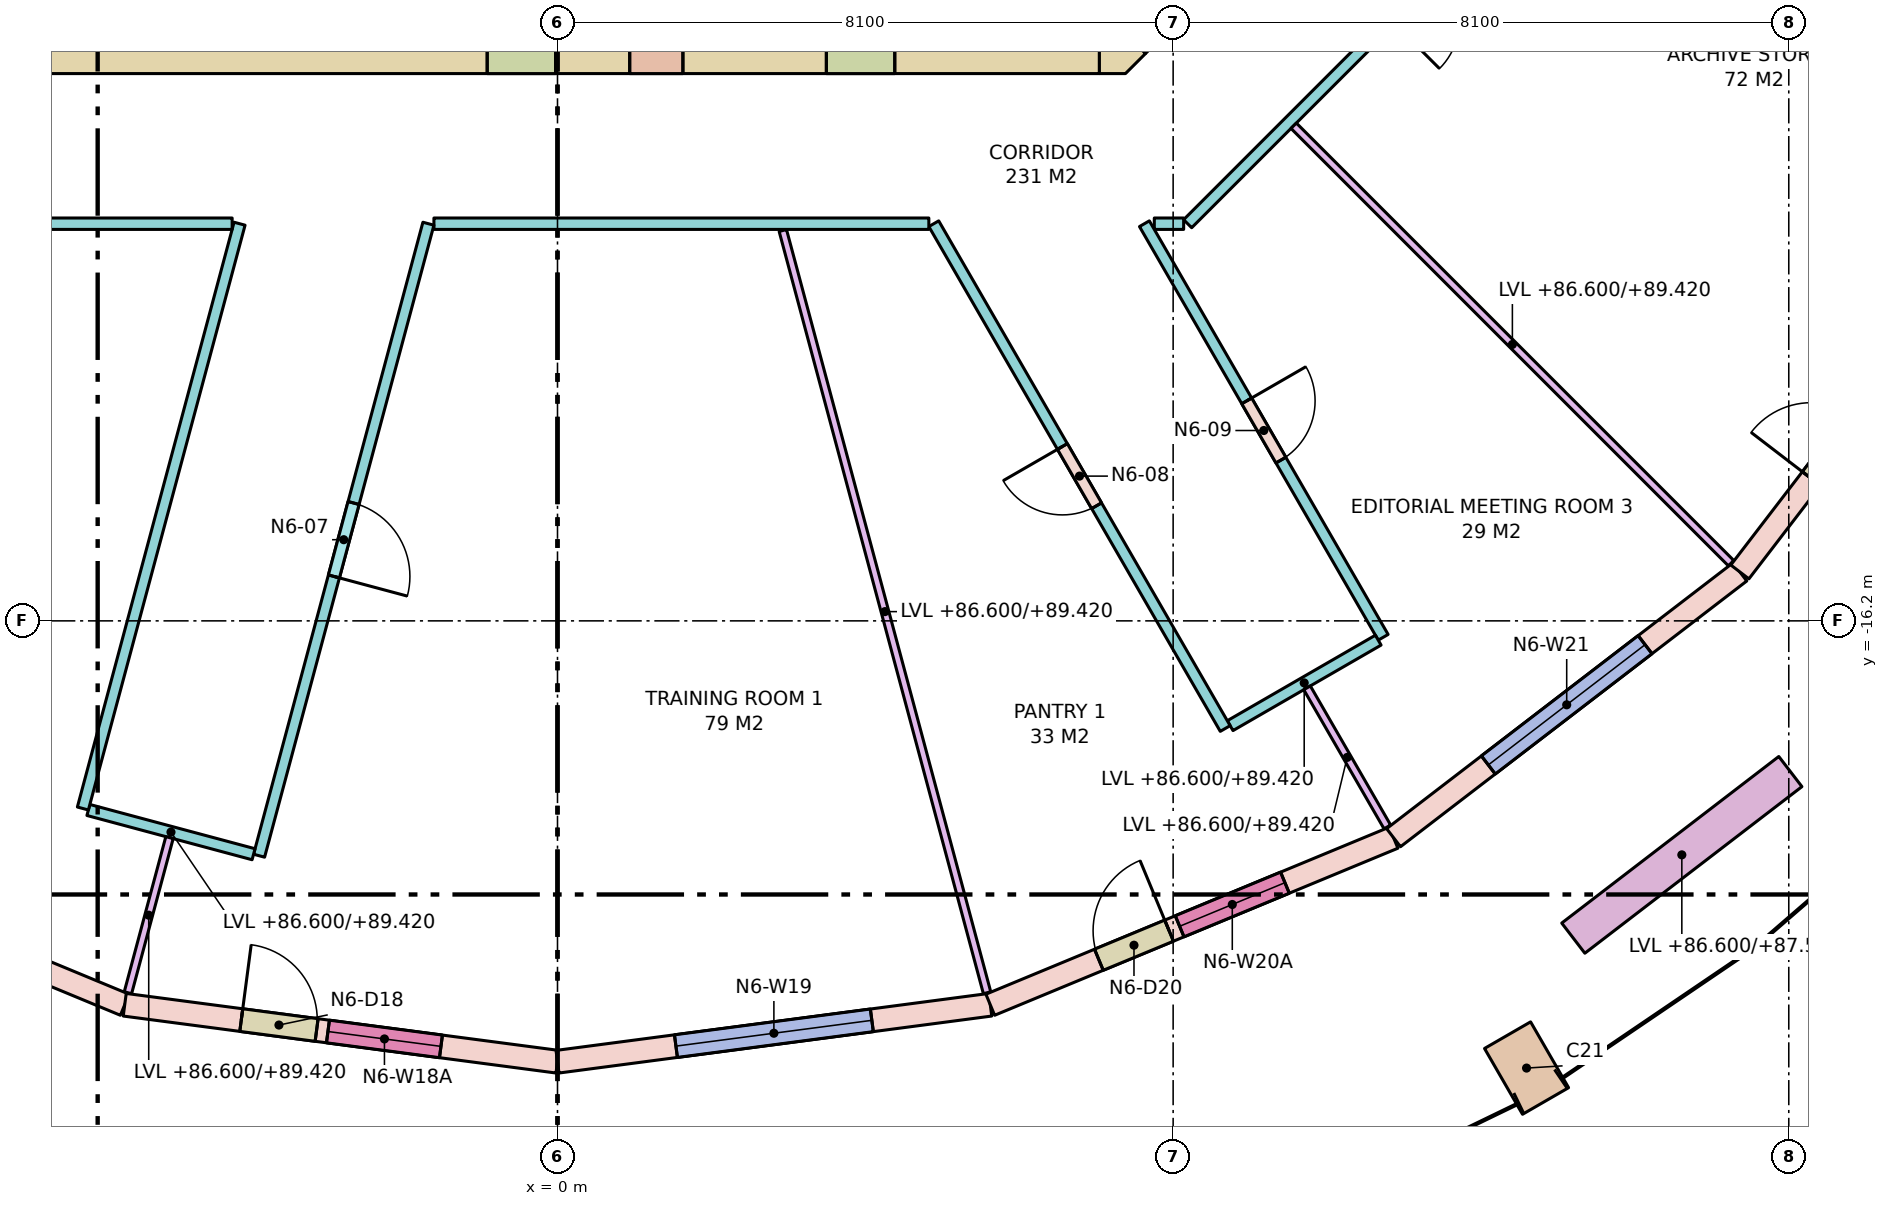
"""IFC4 building model, lengths in metres.
Left out: names, types, materials, properties, quantities, classifications, styles, units other than length and angle.
Written with IfcOpenShell. Run it as: python <this file> out.ifc"""

import sys

from ifc_helpers import new_model, si_unit, direction, frame, frame_2d, origin, origin_2d, place, context, subcontext, project, spatial, polyline, rectangle, outline, extrude, element, fill, save


model = new_model("IFC4")
c1 = context("Model", 3, precision=1e-05, world=origin(), true_north=direction((0.0, 1.0)))
c2 = subcontext(c1, "Body", "Model", "MODEL_VIEW")
j1 = project(units=[si_unit("LENGTHUNIT", "METRE"), si_unit("PLANEANGLEUNIT", "RADIAN")], contexts=[c1])
p1 = place(None, origin())
s1 = spatial("IfcSite", under=j1, at=p1, CompositionType="ELEMENT")
p2 = place(p1, origin())
s2 = spatial("IfcBuilding", under=s1, at=p2, CompositionType="ELEMENT")
p3 = place(p2, frame((0.0, 0.0, 86.6)))
s3 = spatial("IfcBuildingStorey", under=s2, at=p3, CompositionType="ELEMENT", Elevation=86.6)
p4 = place(p3, frame((12.75, -22.084, 0.0), z_axis=(0.0, 0.0, 1.0), x_axis=(0.866025403784, 0.5, 0.0)))
e1 = element("IfcColumn", 1, at=p4, inside=s3, PredefinedType="COLUMN", context=c2, shape_type="SweptSolid", body=[
    extrude(rectangle(XDim=0.7, YDim=1.0, at=origin_2d()), origin(), (0.0, 0.0, 1.0), 4.0),
])
p5 = place(p3, frame((-7.13, -8.55, -0.28), z_axis=(0.0, 0.0, 1.0), x_axis=(1.0, 0.0, 0.0)))
e2 = element("IfcWall", 2, at=p5, inside=s3, PredefinedType="SHEAR", context=c2, shape_type="SweptSolid", body=[
    extrude(rectangle(XDim=14.26, YDim=0.9, at=frame_2d((7.13, 0.0))), origin(), (0.0, 0.0, 1.0), 4.0),
])
p6 = place(p5, frame((8.08, 0.0, 0.28)))
e3 = element("IfcOpeningElement", 3, at=p6, cuts=e2, PredefinedType="OPENING", context=c2, shape_type="SweptSolid", body=[
    extrude(rectangle(XDim=0.7, YDim=2.1, at=frame_2d((0.35, 1.05))), frame((0.0, 0.46, 0.0), z_axis=(0.0, -1.0, 0.0), x_axis=(1.0, 0.0, 0.0)), (0.0, 0.0, 1.0), 0.92),
])
p7 = place(p5, frame((6.205, 0.0, 0.28)))
e4 = element("IfcOpeningElement", 4, at=p7, cuts=e2, PredefinedType="OPENING", context=c2, shape_type="SweptSolid", body=[
    extrude(rectangle(XDim=0.9, YDim=2.1, at=frame_2d((0.45, 1.05))), frame((0.0, 0.46, 0.0), z_axis=(0.0, -1.0, 0.0), x_axis=(1.0, 0.0, 0.0)), (0.0, 0.0, 1.0), 0.92),
])
p8 = place(p5, frame((10.667, 0.0, 0.28)))
e5 = element("IfcOpeningElement", 5, at=p8, cuts=e2, PredefinedType="OPENING", context=c2, shape_type="SweptSolid", body=[
    extrude(rectangle(XDim=0.9, YDim=2.1, at=frame_2d((0.45, 1.05))), frame((0.0, 0.46, 0.0), z_axis=(0.0, -1.0, 0.0), x_axis=(1.0, 0.0, 0.0)), (0.0, 0.0, 1.0), 0.92),
])
p9 = place(p3, frame((10.418, -5.418, -0.28), z_axis=(0.0, 0.0, 1.0), x_axis=(-0.707106781187, -0.707106781187, 0.0)))
e6 = element("IfcWall", 6, at=p9, inside=s3, PredefinedType="SHEAR", context=c2, shape_type="SweptSolid", body=[
    extrude(rectangle(XDim=4.243, YDim=0.9, at=frame_2d((2.121, 0.0))), origin(), (0.0, 0.0, 1.0), 4.0),
])
p10 = place(p9, frame((0.52, 0.0, 0.28)))
e7 = element("IfcOpeningElement", 7, at=p10, cuts=e6, PredefinedType="OPENING", context=c2, shape_type="SweptSolid", body=[
    extrude(rectangle(XDim=0.9, YDim=2.1, at=frame_2d((0.45, 1.05))), frame((0.0, 0.46, 0.0), z_axis=(0.0, -1.0, 0.0), x_axis=(1.0, 0.0, 0.0)), (0.0, 0.0, 1.0), 0.92),
])
p11 = place(p3, frame((0.0, 0.0, -0.28)))
e8 = element("IfcWall", 8, at=p11, inside=s3, PredefinedType="SHEAR", context=c2, shape_type="SweptSolid", body=[
    extrude(outline(polyline([(7.473, -9.0), (7.13, -9.0), (7.13, -8.13), (7.736, -8.736), (7.473, -9.0)])), origin(), (0.0, 0.0, 1.0), 4.0),
])
p12 = place(p3, frame((-11.0, -19.052, 0.0), z_axis=(0.0, 0.0, 1.0), x_axis=(0.923866055759, -0.382715966503, 0.0)))
e9 = element("IfcWall", 9, at=p12, inside=s3, PredefinedType="STANDARD", context=c2, shape_type="SweptSolid", body=[
    extrude(rectangle(XDim=5.743, YDim=0.3, at=frame_2d((2.872, 0.0))), origin(), (0.0, 0.0, 1.0), 3.72),
])
p13 = place(p12, frame((1.572, 0.0, 0.8)))
e10 = element("IfcOpeningElement", 10, at=p13, cuts=e9, PredefinedType="OPENING", context=c2, shape_type="SweptSolid", body=[
    extrude(rectangle(XDim=2.6, YDim=2.7, at=frame_2d((1.3, 1.35))), frame((0.0, 0.16, 0.0), z_axis=(0.0, -1.0, 0.0), x_axis=(1.0, 0.0, 0.0)), (0.0, 0.0, 1.0), 0.32),
])
p14 = place(p3, frame((-5.694, -21.25, 0.0), z_axis=(0.0, 0.0, 1.0), x_axis=(0.991447783331, -0.130503995834, 0.0)))
e11 = element("IfcWall", 11, at=p14, inside=s3, PredefinedType="STANDARD", context=c2, shape_type="SweptSolid", body=[
    extrude(rectangle(XDim=5.743, YDim=0.3, at=frame_2d((2.872, 0.0))), origin(), (0.0, 0.0, 1.0), 3.72),
])
p15 = place(p14, frame((1.547, 0.0, 0.0)))
e12 = element("IfcOpeningElement", 12, at=p15, cuts=e11, PredefinedType="OPENING", context=c2, shape_type="SweptSolid", body=[
    extrude(rectangle(XDim=1.0, YDim=2.4, at=frame_2d((0.5, 1.2))), frame((0.0, 0.16, 0.0), z_axis=(0.0, -1.0, 0.0), x_axis=(1.0, 0.0, 0.0)), (0.0, 0.0, 1.0), 0.32),
])
p16 = place(p14, frame((2.697, 0.0, 0.8)))
e13 = element("IfcOpeningElement", 13, at=p16, cuts=e11, PredefinedType="OPENING", context=c2, shape_type="SweptSolid", body=[
    extrude(rectangle(XDim=1.5, YDim=2.7, at=frame_2d((0.75, 1.35))), frame((0.0, 0.16, 0.0), z_axis=(0.0, -1.0, 0.0), x_axis=(1.0, 0.0, 0.0)), (0.0, 0.0, 1.0), 0.32),
])
p17 = place(p3, frame((0.0, -22.0, 0.0), z_axis=(0.0, 0.0, 1.0), x_axis=(0.991447783331, 0.130503995834, 0.0)))
e14 = element("IfcWall", 14, at=p17, inside=s3, PredefinedType="STANDARD", context=c2, shape_type="SweptSolid", body=[
    extrude(rectangle(XDim=5.743, YDim=0.3, at=frame_2d((2.872, 0.0))), origin(), (0.0, 0.0, 1.0), 3.72),
])
p18 = place(p17, frame((1.572, 0.0, 0.8)))
e15 = element("IfcOpeningElement", 15, at=p18, cuts=e14, PredefinedType="OPENING", context=c2, shape_type="SweptSolid", body=[
    extrude(rectangle(XDim=2.6, YDim=2.7, at=frame_2d((1.3, 1.35))), frame((0.0, 0.16, 0.0), z_axis=(0.0, -1.0, 0.0), x_axis=(1.0, 0.0, 0.0)), (0.0, 0.0, 1.0), 0.32),
])
p19 = place(p3, frame((5.694, -21.25, 0.0), z_axis=(0.0, 0.0, 1.0), x_axis=(0.923866055759, 0.382715966503, 0.0)))
e16 = element("IfcWall", 16, at=p19, inside=s3, PredefinedType="STANDARD", context=c2, shape_type="SweptSolid", body=[
    extrude(rectangle(XDim=5.743, YDim=0.3, at=frame_2d((2.872, 0.0))), origin(), (0.0, 0.0, 1.0), 3.72),
])
p20 = place(p19, frame((1.547, 0.0, 0.0)))
e17 = element("IfcOpeningElement", 17, at=p20, cuts=e16, PredefinedType="OPENING", context=c2, shape_type="SweptSolid", body=[
    extrude(rectangle(XDim=1.0, YDim=2.4, at=frame_2d((0.5, 1.2))), frame((0.0, 0.16, 0.0), z_axis=(0.0, -1.0, 0.0), x_axis=(1.0, 0.0, 0.0)), (0.0, 0.0, 1.0), 0.32),
])
p21 = place(p19, frame((2.697, 0.0, 0.8)))
e18 = element("IfcOpeningElement", 18, at=p21, cuts=e16, PredefinedType="OPENING", context=c2, shape_type="SweptSolid", body=[
    extrude(rectangle(XDim=1.5, YDim=2.7, at=frame_2d((0.75, 1.35))), frame((0.0, 0.16, 0.0), z_axis=(0.0, -1.0, 0.0), x_axis=(1.0, 0.0, 0.0)), (0.0, 0.0, 1.0), 0.32),
])
p22 = place(p3, frame((11.0, -19.052, 0.0), z_axis=(0.0, 0.0, 1.0), x_axis=(0.793366142647, 0.608744744291, 0.0)))
e19 = element("IfcWall", 19, at=p22, inside=s3, PredefinedType="STANDARD", context=c2, shape_type="SweptSolid", body=[
    extrude(rectangle(XDim=5.743, YDim=0.3, at=frame_2d((2.872, 0.0))), origin(), (0.0, 0.0, 1.0), 3.72),
])
p23 = place(p22, frame((1.572, 0.0, 0.8)))
e20 = element("IfcOpeningElement", 20, at=p23, cuts=e19, PredefinedType="OPENING", context=c2, shape_type="SweptSolid", body=[
    extrude(rectangle(XDim=2.6, YDim=2.7, at=frame_2d((1.3, 1.35))), frame((0.0, 0.16, 0.0), z_axis=(0.0, -1.0, 0.0), x_axis=(1.0, 0.0, 0.0)), (0.0, 0.0, 1.0), 0.32),
])
p24 = place(p3, frame((15.556, -15.556, 0.0), z_axis=(0.0, 0.0, 1.0), x_axis=(0.608744744291, 0.793366142647, 0.0)))
e21 = element("IfcWall", 21, at=p24, inside=s3, PredefinedType="STANDARD", context=c2, shape_type="SweptSolid", body=[
    extrude(rectangle(XDim=5.743, YDim=0.3, at=frame_2d((2.872, 0.0))), origin(), (0.0, 0.0, 1.0), 3.72),
])
p25 = place(p24, frame((1.547, 0.0, 0.0)))
e22 = element("IfcOpeningElement", 22, at=p25, cuts=e21, PredefinedType="OPENING", context=c2, shape_type="SweptSolid", body=[
    extrude(rectangle(XDim=1.0, YDim=2.4, at=frame_2d((0.5, 1.2))), frame((0.0, 0.16, 0.0), z_axis=(0.0, -1.0, 0.0), x_axis=(1.0, 0.0, 0.0)), (0.0, 0.0, 1.0), 0.32),
])
p26 = place(p24, frame((2.697, 0.0, 0.8)))
e23 = element("IfcOpeningElement", 23, at=p26, cuts=e21, PredefinedType="OPENING", context=c2, shape_type="SweptSolid", body=[
    extrude(rectangle(XDim=1.5, YDim=2.7, at=frame_2d((0.75, 1.35))), frame((0.0, 0.16, 0.0), z_axis=(0.0, -1.0, 0.0), x_axis=(1.0, 0.0, 0.0)), (0.0, 0.0, 1.0), 0.32),
])
p27 = place(p3, frame((13.365, -20.374, 0.0), z_axis=(0.0, 0.0, 1.0), x_axis=(0.793326845617, 0.608795955984, 0.0)))
e24 = element("IfcWall", 24, at=p27, inside=s3, PredefinedType="PARAPET", context=c2, shape_type="SweptSolid", body=[
    extrude(rectangle(XDim=3.6, YDim=0.5, at=frame_2d((1.8, 0.0))), origin(), (0.0, 0.0, 1.0), 0.9),
])
p28 = place(p3, frame((12.975, -6.291, 0.0), z_axis=(0.0, 0.0, 1.0), x_axis=(-0.707106781187, -0.707106781187, 0.0)))
e25 = element("IfcWall", 25, at=p28, inside=s3, PredefinedType="PARTITIONING", context=c2, shape_type="SweptSolid", body=[
    extrude(rectangle(XDim=6.624, YDim=0.15, at=frame_2d((3.312, 0.0))), origin(), (0.0, 0.0, 1.0), 2.82),
])
p29 = place(p28, frame((1.938, 0.0, 0.0)))
e26 = element("IfcOpeningElement", 26, at=p29, cuts=e25, PredefinedType="OPENING", context=c2, shape_type="SweptSolid", body=[
    extrude(rectangle(XDim=0.9, YDim=2.1, at=frame_2d((0.45, 1.05))), frame((0.0, 0.085, 0.0), z_axis=(0.0, -1.0, 0.0), x_axis=(1.0, 0.0, 0.0)), (0.0, 0.0, 1.0), 0.17),
])
p30 = place(p3, frame((8.238, -10.975, 0.0), z_axis=(0.0, 0.0, 1.0), x_axis=(-1.0, 0.0, 0.0)))
e27 = element("IfcWall", 27, at=p30, inside=s3, PredefinedType="PARTITIONING", context=c2, shape_type="SweptSolid", body=[
    extrude(rectangle(XDim=0.386, YDim=0.15, at=frame_2d((0.193, 0.0))), origin(), (0.0, 0.0, 1.0), 3.72),
])
p31 = place(p3, frame((7.722, -10.975, 0.0), z_axis=(0.0, 0.0, 1.0), x_axis=(0.499988183684, -0.86603222583, 0.0)))
e28 = element("IfcWall", 28, at=p31, inside=s3, PredefinedType="PARTITIONING", context=c2, shape_type="SweptSolid", body=[
    extrude(rectangle(XDim=6.283, YDim=0.15, at=frame_2d((3.142, 0.0))), origin(), (0.0, 0.0, 1.0), 3.72),
])
p32 = place(p31, frame((2.691, 0.0, 0.0)))
e29 = element("IfcOpeningElement", 29, at=p32, cuts=e28, PredefinedType="OPENING", context=c2, shape_type="SweptSolid", body=[
    extrude(rectangle(XDim=0.9, YDim=2.1, at=frame_2d((0.45, 1.05))), frame((0.0, 0.085, 0.0), z_axis=(0.0, -1.0, 0.0), x_axis=(1.0, 0.0, 0.0)), (0.0, 0.0, 1.0), 0.17),
])
p33 = place(p3, frame((10.799, -16.454, 0.0), z_axis=(0.0, 0.0, 1.0), x_axis=(-0.866017533419, -0.500013631625, 0.0)))
e30 = element("IfcWall", 30, at=p33, inside=s3, PredefinedType="PARTITIONING", context=c2, shape_type="SweptSolid", body=[
    extrude(rectangle(XDim=2.25, YDim=0.15, at=frame_2d((1.125, 0.0))), origin(), (0.0, 0.0, 1.0), 2.82),
])
p34 = place(p3, frame((8.785, -17.616, 0.0), z_axis=(0.0, 0.0, 1.0), x_axis=(-0.500021918639, 0.866012748683, 0.0)))
e31 = element("IfcWall", 31, at=p34, inside=s3, PredefinedType="PARTITIONING", context=c2, shape_type="SweptSolid", body=[
    extrude(rectangle(XDim=7.669, YDim=0.15, at=frame_2d((3.834, 0.0))), origin(), (0.0, 0.0, 1.0), 3.72),
])
p35 = place(p34, frame((3.384, 0.0, 0.0)))
e32 = element("IfcOpeningElement", 32, at=p35, cuts=e31, PredefinedType="OPENING", context=c2, shape_type="SweptSolid", body=[
    extrude(rectangle(XDim=0.9, YDim=2.1, at=frame_2d((0.45, 1.05))), frame((0.0, 0.085, 0.0), z_axis=(0.0, -1.0, 0.0), x_axis=(1.0, 0.0, 0.0)), (0.0, 0.0, 1.0), 0.17),
])
p36 = place(p3, frame((4.886, -10.975, 0.0), z_axis=(0.0, 0.0, 1.0), x_axis=(-1.0, 0.0, 0.0)))
e33 = element("IfcWall", 33, at=p36, inside=s3, PredefinedType="PARTITIONING", context=c2, shape_type="SweptSolid", body=[
    extrude(rectangle(XDim=6.512, YDim=0.15, at=frame_2d((3.256, 0.0))), origin(), (0.0, 0.0, 1.0), 2.82),
])
p37 = place(p3, frame((-1.698, -10.975, 0.0), z_axis=(0.0, 0.0, 1.0), x_axis=(-0.258804606039, -0.965929695109, 0.0)))
e34 = element("IfcWall", 34, at=p37, inside=s3, PredefinedType="PARTITIONING", context=c2, shape_type="SweptSolid", body=[
    extrude(rectangle(XDim=8.608, YDim=0.15, at=frame_2d((4.304, 0.0))), origin(), (0.0, 0.0, 1.0), 3.72),
])
p38 = place(p37, frame((3.804, 0.0, 0.0)))
e35 = element("IfcOpeningElement", 35, at=p38, cuts=e34, PredefinedType="OPENING", context=c2, shape_type="SweptSolid", body=[
    extrude(rectangle(XDim=1.0, YDim=2.1, at=frame_2d((0.5, 1.05))), frame((0.0, 0.085, 0.0), z_axis=(0.0, -1.0, 0.0), x_axis=(1.0, 0.0, 0.0)), (0.0, 0.0, 1.0), 0.17),
])
p39 = place(p3, frame((-3.999, -19.271, 0.0), z_axis=(0.0, 0.0, 1.0), x_axis=(-0.965906393436, 0.258891558609, 0.0)))
e36 = element("IfcWall", 36, at=p39, inside=s3, PredefinedType="PARTITIONING", context=c2, shape_type="SweptSolid", body=[
    extrude(rectangle(XDim=2.25, YDim=0.15, at=frame_2d((1.125, 0.0))), origin(), (0.0, 0.0, 1.0), 2.82),
])
p40 = place(p3, frame((-6.245, -18.669, 0.0), z_axis=(0.0, 0.0, 1.0), x_axis=(0.258822393938, 0.965924928965, 0.0)))
e37 = element("IfcWall", 37, at=p40, inside=s3, PredefinedType="PARTITIONING", context=c2, shape_type="SweptSolid", body=[
    extrude(rectangle(XDim=7.965, YDim=0.15, at=frame_2d((3.982, 0.0))), origin(), (0.0, 0.0, 1.0), 3.72),
])
p41 = place(p3, frame((-4.281, -10.975, 0.0), z_axis=(0.0, 0.0, 1.0), x_axis=(-1.0, 0.0, 0.0)))
e38 = element("IfcWall", 38, at=p41, inside=s3, PredefinedType="PARTITIONING", context=c2, shape_type="SweptSolid", body=[
    extrude(rectangle(XDim=3.958, YDim=0.15, at=frame_2d((1.979, 0.0))), origin(), (0.0, 0.0, 1.0), 2.82),
])
p42 = place(p3, frame((-5.105, -19.052, 0.0), z_axis=(0.0, 0.0, 1.0), x_axis=(-0.258813089189, -0.965927422152, 0.0)))
e39 = element("IfcWall", 39, at=p42, inside=s3, PredefinedType="PARTITIONING", context=c2, shape_type="SweptSolid", body=[
    extrude(rectangle(XDim=2.113, YDim=0.1, at=frame_2d((1.057, 0.0))), origin(), (0.0, 0.0, 1.0), 2.82),
])
p43 = place(p3, frame((2.965, -11.064, 0.0), z_axis=(0.0, 0.0, 1.0), x_axis=(0.258834819477, -0.96592159942, 0.0)))
e40 = element("IfcWall", 40, at=p43, inside=s3, PredefinedType="PARTITIONING", context=c2, shape_type="SweptSolid", body=[
    extrude(rectangle(XDim=10.382, YDim=0.1, at=frame_2d((5.191, 0.0))), origin(), (0.0, 0.0, 1.0), 2.82),
])
p44 = place(p3, frame((9.862, -17.081, 0.0), z_axis=(0.0, 0.0, 1.0), x_axis=(0.500065834316, -0.865987390988, 0.0)))
e41 = element("IfcWall", 41, at=p44, inside=s3, PredefinedType="PARTITIONING", context=c2, shape_type="SweptSolid", body=[
    extrude(rectangle(XDim=2.113, YDim=0.1, at=frame_2d((1.057, 0.0))), origin(), (0.0, 0.0, 1.0), 2.82),
])
p45 = place(p3, frame((9.686, -9.686, 0.0), z_axis=(0.0, 0.0, 1.0), x_axis=(0.707106781187, -0.707106781187, 0.0)))
e42 = element("IfcWall", 42, at=p45, inside=s3, PredefinedType="PARTITIONING", context=c2, shape_type="SweptSolid", body=[
    extrude(rectangle(XDim=8.139, YDim=0.1, at=frame_2d((4.069, 0.0))), origin(), (0.0, 0.0, 1.0), 2.82),
])
p46 = place(p15, origin())
e43 = element("IfcDoor", 43, at=p46, inside=s3, OperationType="SINGLE_SWING_LEFT", PredefinedType="DOOR", context=c2, shape_type="SweptSolid", body=[
    extrude(rectangle(XDim=1.0, YDim=2.4, at=frame_2d((0.5, 1.2))), frame((0.0, 0.025, 0.0), z_axis=(0.0, -1.0, 0.0), x_axis=(1.0, 0.0, 0.0)), (0.0, 0.0, 1.0), 0.05),
])
fill(e12, e43)
p47 = place(p16, origin())
e44 = element("IfcWindow", 44, at=p47, inside=s3, PartitioningType="SINGLE_PANEL", PredefinedType="WINDOW", context=c2, shape_type="SweptSolid", body=[
    extrude(rectangle(XDim=1.5, YDim=2.7, at=frame_2d((0.75, 1.35))), frame((0.0, 0.03, 0.0), z_axis=(0.0, -1.0, 0.0), x_axis=(1.0, 0.0, 0.0)), (0.0, 0.0, 1.0), 0.06),
])
fill(e13, e44)
p48 = place(p18, origin())
e45 = element("IfcWindow", 45, at=p48, inside=s3, PartitioningType="SINGLE_PANEL", PredefinedType="WINDOW", context=c2, shape_type="SweptSolid", body=[
    extrude(rectangle(XDim=2.6, YDim=2.7, at=frame_2d((1.3, 1.35))), frame((0.0, 0.03, 0.0), z_axis=(0.0, -1.0, 0.0), x_axis=(1.0, 0.0, 0.0)), (0.0, 0.0, 1.0), 0.06),
])
fill(e15, e45)
p49 = place(p20, origin())
e46 = element("IfcDoor", 46, at=p49, inside=s3, OperationType="SINGLE_SWING_RIGHT", PredefinedType="DOOR", context=c2, shape_type="SweptSolid", body=[
    extrude(rectangle(XDim=1.0, YDim=2.4, at=frame_2d((0.5, 1.2))), frame((0.0, 0.025, 0.0), z_axis=(0.0, -1.0, 0.0), x_axis=(1.0, 0.0, 0.0)), (0.0, 0.0, 1.0), 0.05),
])
fill(e17, e46)
p50 = place(p21, origin())
e47 = element("IfcWindow", 47, at=p50, inside=s3, PartitioningType="SINGLE_PANEL", PredefinedType="WINDOW", context=c2, shape_type="SweptSolid", body=[
    extrude(rectangle(XDim=1.5, YDim=2.7, at=frame_2d((0.75, 1.35))), frame((0.0, 0.03, 0.0), z_axis=(0.0, -1.0, 0.0), x_axis=(1.0, 0.0, 0.0)), (0.0, 0.0, 1.0), 0.06),
])
fill(e18, e47)
p51 = place(p23, origin())
e48 = element("IfcWindow", 48, at=p51, inside=s3, PartitioningType="SINGLE_PANEL", PredefinedType="WINDOW", context=c2, shape_type="SweptSolid", body=[
    extrude(rectangle(XDim=2.6, YDim=2.7, at=frame_2d((1.3, 1.35))), frame((0.0, 0.03, 0.0), z_axis=(0.0, -1.0, 0.0), x_axis=(1.0, 0.0, 0.0)), (0.0, 0.0, 1.0), 0.06),
])
fill(e20, e48)
p52 = place(p38, origin())
e49 = element("IfcDoor", 49, at=p52, inside=s3, OperationType="SINGLE_SWING_RIGHT", PredefinedType="DOOR", context=c2, shape_type="SweptSolid", body=[
    extrude(rectangle(XDim=1.0, YDim=2.1, at=frame_2d((0.5, 1.05))), frame((0.0, 0.025, 0.0), z_axis=(0.0, -1.0, 0.0), x_axis=(1.0, 0.0, 0.0)), (0.0, 0.0, 1.0), 0.05),
])
fill(e35, e49)
p53 = place(p35, origin())
e50 = element("IfcDoor", 50, at=p53, inside=s3, OperationType="SINGLE_SWING_RIGHT", PredefinedType="DOOR", context=c2, shape_type="SweptSolid", body=[
    extrude(rectangle(XDim=0.9, YDim=2.1, at=frame_2d((0.45, 1.05))), frame((0.0, 0.025, 0.0), z_axis=(0.0, -1.0, 0.0), x_axis=(1.0, 0.0, 0.0)), (0.0, 0.0, 1.0), 0.05),
])
fill(e32, e50)
p54 = place(p32, origin())
e51 = element("IfcDoor", 51, at=p54, inside=s3, OperationType="SINGLE_SWING_LEFT", PredefinedType="DOOR", context=c2, shape_type="SweptSolid", body=[
    extrude(rectangle(XDim=0.9, YDim=2.1, at=frame_2d((0.45, 1.05))), frame((0.0, 0.025, 0.0), z_axis=(0.0, -1.0, 0.0), x_axis=(1.0, 0.0, 0.0)), (0.0, 0.0, 1.0), 0.05),
])
fill(e29, e51)
save(model, sys.argv[1])
